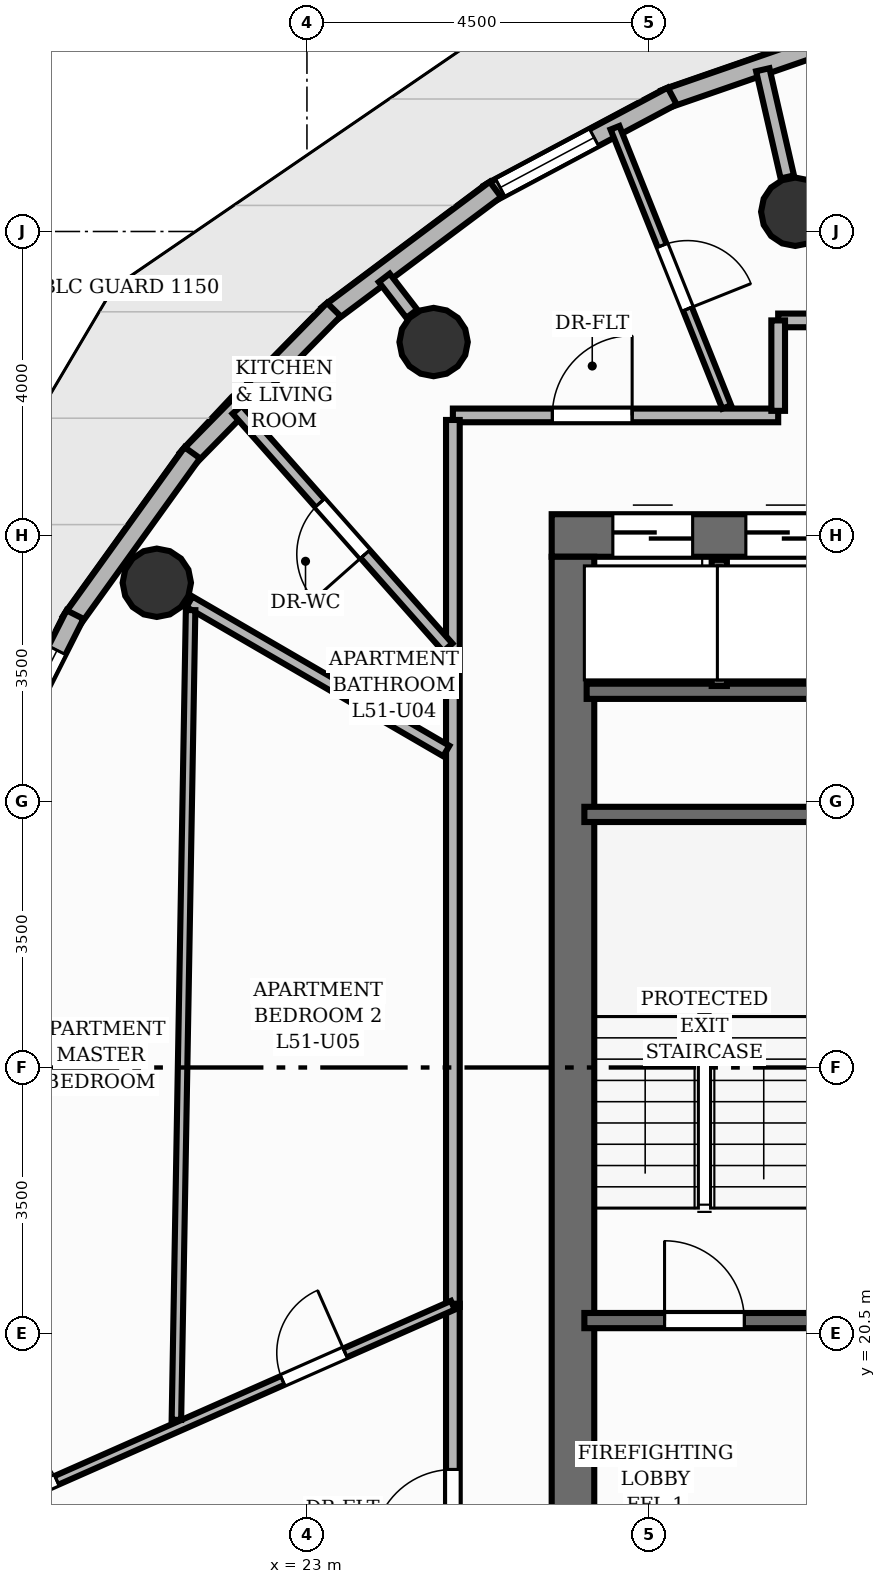
"""IFC4 building model, lengths in metres.
Left out: names, types, materials, properties, quantities, classifications, styles, units other than length and angle.
Written with IfcOpenShell. Run it as: python <this file> out.ifc"""

import sys

from ifc_helpers import new_model, si_unit, direction, frame, frame_2d, origin, origin_2d, place, context, subcontext, project, spatial, rectangle, circle, extrude, element, fill, save


model = new_model("IFC4")
c1 = context("Model", 3, precision=1e-05, world=origin(), true_north=direction((0.0, 1.0)))
c2 = subcontext(c1, "Body", "Model", "MODEL_VIEW")
j1 = project(units=[si_unit("LENGTHUNIT", "METRE"), si_unit("PLANEANGLEUNIT", "RADIAN")], contexts=[c1])
p1 = place(None, origin())
s1 = spatial("IfcSite", under=j1, at=p1, CompositionType="ELEMENT")
p2 = place(p1, origin())
s2 = spatial("IfcBuilding", under=s1, at=p2, CompositionType="ELEMENT")
p3 = place(p2, frame((0.0, 0.0, 172.64)))
s3 = spatial("IfcBuildingStorey", under=s2, at=p3, CompositionType="ELEMENT", Elevation=172.64)
p4 = place(p3, frame((26.22, 31.0, 0.0), z_axis=(0.0, 0.0, 1.0), x_axis=(1.0, 0.0, 0.0)))
e1 = element("IfcWall", 1, at=p4, inside=s3, PredefinedType="SHEAR", context=c2, shape_type="SweptSolid", body=[
    extrude(rectangle(XDim=11.56, YDim=0.56, at=frame_2d((5.78, 0.0))), origin(), (0.0, 0.0, 1.0), 3.2),
])
p5 = place(p4, frame((8.18, 0.0, 0.0)))
e2 = element("IfcOpeningElement", 2, at=p5, cuts=e1, PredefinedType="OPENING", context=c2, shape_type="SweptSolid", body=[
    extrude(rectangle(XDim=1.1, YDim=2.15, at=frame_2d((0.55, 1.075))), frame((0.0, 0.29, 0.0), z_axis=(0.0, -1.0, 0.0), x_axis=(1.0, 0.0, 0.0)), (0.0, 0.0, 1.0), 0.58),
])
p6 = place(p4, frame((0.805, 0.0, 0.0)))
e3 = element("IfcOpeningElement", 3, at=p6, cuts=e1, PredefinedType="OPENING", context=c2, shape_type="SweptSolid", body=[
    extrude(rectangle(XDim=1.05, YDim=2.15, at=frame_2d((0.525, 1.075))), frame((0.0, 0.29, 0.0), z_axis=(0.0, -1.0, 0.0), x_axis=(1.0, 0.0, 0.0)), (0.0, 0.0, 1.0), 0.58),
])
p7 = place(p4, frame((2.555, 0.0, 0.0)))
e4 = element("IfcOpeningElement", 4, at=p7, cuts=e1, PredefinedType="OPENING", context=c2, shape_type="SweptSolid", body=[
    extrude(rectangle(XDim=1.05, YDim=2.15, at=frame_2d((0.525, 1.075))), frame((0.0, 0.29, 0.0), z_axis=(0.0, -1.0, 0.0), x_axis=(1.0, 0.0, 0.0)), (0.0, 0.0, 1.0), 0.58),
])
p8 = place(p4, frame((4.305, 0.0, 0.0)))
e5 = element("IfcOpeningElement", 5, at=p8, cuts=e1, PredefinedType="OPENING", context=c2, shape_type="SweptSolid", body=[
    extrude(rectangle(XDim=1.05, YDim=2.15, at=frame_2d((0.525, 1.075))), frame((0.0, 0.29, 0.0), z_axis=(0.0, -1.0, 0.0), x_axis=(1.0, 0.0, 0.0)), (0.0, 0.0, 1.0), 0.58),
])
p9 = place(p3, frame((26.5, 17.28, 0.0), z_axis=(0.0, 0.0, 1.0), x_axis=(0.0, 1.0, 0.0)))
e6 = element("IfcWall", 6, at=p9, inside=s3, PredefinedType="SHEAR", context=c2, shape_type="SweptSolid", body=[
    extrude(rectangle(XDim=13.44, YDim=0.56, at=frame_2d((6.72, 0.0))), origin(), (0.0, 0.0, 1.0), 3.2),
])
for number, where, z_axis, x_axis in (
    (7, (29.425, 35.26, 0.0), (0.0, 0.0, 1.0), (1.0, 0.0, 0.0)),
    (8, (24.667, 33.545, 0.0), (0.0, 0.0, 1.0), (1.0, 0.0, 0.0)),
    (9, (21.025, 30.378, 0.0), (0.0, 0.0, 1.0), (1.0, 0.0, 0.0)),
):
    element("IfcColumn", number, at=place(p3, frame(where, z_axis=z_axis, x_axis=x_axis)), inside=s3, PredefinedType="COLUMN", context=c2, shape_type="SweptSolid", body=[
        extrude(circle(Radius=0.45, at=origin_2d()), origin(), (0.0, 0.0, 1.0), 3.2),
    ])
p10 = place(p3, frame((27.705, 36.739, 0.0), z_axis=(0.0, 0.0, 1.0), x_axis=(0.945016150651, 0.327023661236, 0.0)))
e10 = element("IfcWall", 10, at=p10, inside=s3, PredefinedType="SOLIDWALL", context=c2, shape_type="SweptSolid", body=[
    extrude(rectangle(XDim=2.702, YDim=0.25, at=frame_2d((1.351, 0.0))), origin(), (0.0, 0.0, 1.0), 2.96),
])
p11 = place(p3, frame((25.388, 35.495, 0.0), z_axis=(0.0, 0.0, 1.0), x_axis=(0.88257494418, 0.47017174299, 0.0)))
e11 = element("IfcWall", 11, at=p11, inside=s3, PredefinedType="SOLIDWALL", context=c2, shape_type="SweptSolid", body=[
    extrude(rectangle(XDim=2.739, YDim=0.25, at=frame_2d((1.369, 0.0))), origin(), (0.0, 0.0, 1.0), 2.96),
])
p12 = place(p11, frame((0.175, 0.0, 0.85)))
e12 = element("IfcOpeningElement", 12, at=p12, cuts=e11, PredefinedType="OPENING", context=c2, shape_type="SweptSolid", body=[
    extrude(rectangle(XDim=1.4, YDim=1.55, at=frame_2d((0.7, 0.775))), frame((0.0, 0.135, 0.0), z_axis=(0.0, -1.0, 0.0), x_axis=(1.0, 0.0, 0.0)), (0.0, 0.0, 1.0), 0.27),
])
p13 = place(p3, frame((23.272, 33.901, 0.0), z_axis=(0.0, 0.0, 1.0), x_axis=(0.800636941996, 0.599149803564, 0.0)))
e13 = element("IfcWall", 13, at=p13, inside=s3, PredefinedType="SOLIDWALL", context=c2, shape_type="SweptSolid", body=[
    extrude(rectangle(XDim=2.758, YDim=0.25, at=frame_2d((1.379, 0.0))), origin(), (0.0, 0.0, 1.0), 2.96),
])
p14 = place(p3, frame((21.421, 32.005, 0.0), z_axis=(0.0, 0.0, 1.0), x_axis=(0.700794099323, 0.713363603189, 0.0)))
e14 = element("IfcWall", 14, at=p14, inside=s3, PredefinedType="SOLIDWALL", context=c2, shape_type="SweptSolid", body=[
    extrude(rectangle(XDim=2.758, YDim=0.25, at=frame_2d((1.379, 0.0))), origin(), (0.0, 0.0, 1.0), 2.96),
])
p15 = place(p3, frame((19.892, 29.865, 0.0), z_axis=(0.0, 0.0, 1.0), x_axis=(0.583975860001, 0.811771023711, 0.0)))
e15 = element("IfcWall", 15, at=p15, inside=s3, PredefinedType="SOLIDWALL", context=c2, shape_type="SweptSolid", body=[
    extrude(rectangle(XDim=2.738, YDim=0.25, at=frame_2d((1.369, 0.0))), origin(), (0.0, 0.0, 1.0), 2.96),
])
p16 = place(p3, frame((18.732, 27.547, 0.0), z_axis=(0.0, 0.0, 1.0), x_axis=(0.450391703917, 0.892831066352, 0.0)))
e16 = element("IfcWall", 16, at=p16, inside=s3, PredefinedType="SOLIDWALL", context=c2, shape_type="SweptSolid", body=[
    extrude(rectangle(XDim=2.702, YDim=0.25, at=frame_2d((1.351, 0.0))), origin(), (0.0, 0.0, 1.0), 2.96),
])
p17 = place(p16, frame((0.526, 0.0, 0.85)))
e17 = element("IfcOpeningElement", 17, at=p17, cuts=e16, PredefinedType="OPENING", context=c2, shape_type="SweptSolid", body=[
    extrude(rectangle(XDim=1.65, YDim=1.55, at=frame_2d((0.825, 0.775))), frame((0.0, 0.135, 0.0), z_axis=(0.0, -1.0, 0.0), x_axis=(1.0, 0.0, 0.0)), (0.0, 0.0, 1.0), 0.27),
])
p18 = place(p3, frame((26.65, 27.33, 0.0), z_axis=(0.0, 0.0, 1.0), x_axis=(1.0, 0.0, 0.0)))
e18 = element("IfcWall", 18, at=p18, inside=s3, PredefinedType="SHEAR", context=c2, shape_type="SweptSolid", body=[
    extrude(rectangle(XDim=3.24, YDim=0.2, at=frame_2d((1.62, 0.0))), origin(), (0.0, 0.0, 1.0), 3.2),
])
p19 = place(p3, frame((26.65, 20.67, 0.0), z_axis=(0.0, 0.0, 1.0), x_axis=(1.0, 0.0, 0.0)))
e19 = element("IfcWall", 19, at=p19, inside=s3, PredefinedType="SHEAR", context=c2, shape_type="SweptSolid", body=[
    extrude(rectangle(XDim=3.24, YDim=0.2, at=frame_2d((1.62, 0.0))), origin(), (0.0, 0.0, 1.0), 3.2),
])
p20 = place(p19, frame((1.055, 0.0, 0.0)))
e20 = element("IfcOpeningElement", 20, at=p20, cuts=e19, PredefinedType="OPENING", context=c2, shape_type="SweptSolid", body=[
    extrude(rectangle(XDim=1.05, YDim=2.15, at=frame_2d((0.525, 1.075))), frame((0.0, 0.11, 0.0), z_axis=(0.0, -1.0, 0.0), x_axis=(1.0, 0.0, 0.0)), (0.0, 0.0, 1.0), 0.22),
])
p21 = place(p3, frame((26.68, 28.95, 0.0), z_axis=(0.0, 0.0, 1.0), x_axis=(1.0, 0.0, 0.0)))
e21 = element("IfcWall", 21, at=p21, inside=s3, PredefinedType="SHEAR", context=c2, shape_type="SweptSolid", body=[
    extrude(rectangle(XDim=5.24, YDim=0.2, at=frame_2d((2.62, 0.0))), origin(), (0.0, 0.0, 1.0), 3.2),
])
p22 = place(p3, frame((28.425, 29.02, 0.0), z_axis=(0.0, 0.0, 1.0), x_axis=(0.0, 1.0, 0.0)))
e22 = element("IfcWall", 22, at=p22, inside=s3, PredefinedType="SHEAR", context=c2, shape_type="SweptSolid", body=[
    extrude(rectangle(XDim=1.66, YDim=0.2, at=frame_2d((0.83, 0.0))), origin(), (0.0, 0.0, 1.0), 3.2),
])
p23 = place(p3, frame((29.32, 35.718, 0.0), z_axis=(0.0, 0.0, 1.0), x_axis=(-0.22299884629, 0.974818708557, 0.0)))
e23 = element("IfcWall", 23, at=p23, inside=s3, PredefinedType="PARTITIONING", context=c2, shape_type="SweptSolid", body=[
    extrude(rectangle(XDim=1.447, YDim=0.18, at=frame_2d((0.724, 0.0))), origin(), (0.0, 0.0, 1.0), 2.404),
])
p24 = place(p3, frame((24.38, 33.918, 0.0), z_axis=(0.0, 0.0, 1.0), x_axis=(-0.609274747308, 0.792959193334, 0.0)))
e24 = element("IfcWall", 24, at=p24, inside=s3, PredefinedType="PARTITIONING", context=c2, shape_type="SweptSolid", body=[
    extrude(rectangle(XDim=0.595, YDim=0.18, at=frame_2d((0.298, 0.0))), origin(), (0.0, 0.0, 1.0), 2.404),
])
p25 = place(p3, frame((29.2, 33.83, 0.0), z_axis=(0.0, 0.0, 1.0), x_axis=(1.0, 0.0, 0.0)))
e25 = element("IfcWall", 25, at=p25, inside=s3, PredefinedType="PARTITIONING", context=c2, shape_type="SweptSolid", body=[
    extrude(rectangle(XDim=5.6, YDim=0.18, at=frame_2d((2.8, 0.0))), origin(), (0.0, 0.0, 1.0), 2.955),
])
p26 = place(p3, frame((24.92, 32.58, 0.0), z_axis=(0.0, 0.0, 1.0), x_axis=(1.0, 0.0, 0.0)))
e26 = element("IfcWall", 26, at=p26, inside=s3, PredefinedType="PARTITIONING", context=c2, shape_type="SweptSolid", body=[
    extrude(rectangle(XDim=4.28, YDim=0.18, at=frame_2d((2.14, 0.0))), origin(), (0.0, 0.0, 1.0), 2.955),
])
p27 = place(p26, frame((1.309, 0.0, 0.0)))
e27 = element("IfcOpeningElement", 27, at=p27, cuts=e26, PredefinedType="OPENING", context=c2, shape_type="SweptSolid", body=[
    extrude(rectangle(XDim=1.05, YDim=2.15, at=frame_2d((0.525, 1.075))), frame((0.0, 0.1, 0.0), z_axis=(0.0, -1.0, 0.0), x_axis=(1.0, 0.0, 0.0)), (0.0, 0.0, 1.0), 0.2),
])
p28 = place(p3, frame((24.92, 20.85, 0.0), z_axis=(0.0, 0.0, 1.0), x_axis=(0.0, 1.0, 0.0)))
e28 = element("IfcWall", 28, at=p28, inside=s3, PredefinedType="PARTITIONING", context=c2, shape_type="SweptSolid", body=[
    extrude(rectangle(XDim=11.67, YDim=0.18, at=frame_2d((5.835, 0.0))), origin(), (0.0, 0.0, 1.0), 2.955),
])
p29 = place(p3, frame((29.2, 32.64, 0.0), z_axis=(0.0, 0.0, 1.0), x_axis=(0.0, 1.0, 0.0)))
e29 = element("IfcWall", 29, at=p29, inside=s3, PredefinedType="PARTITIONING", context=c2, shape_type="SweptSolid", body=[
    extrude(rectangle(XDim=1.19, YDim=0.18, at=frame_2d((0.595, 0.0))), origin(), (0.0, 0.0, 1.0), 2.955),
])
p30 = place(p3, frame((24.92, 15.48, 0.0), z_axis=(0.0, 0.0, 1.0), x_axis=(0.0, 1.0, 0.0)))
e30 = element("IfcWall", 30, at=p30, inside=s3, PredefinedType="PARTITIONING", context=c2, shape_type="SweptSolid", body=[
    extrude(rectangle(XDim=5.412, YDim=0.18, at=frame_2d((2.706, 0.0))), origin(), (0.0, 0.0, 1.0), 2.955),
])
p31 = place(p30, frame((2.181, 0.0, 0.0)))
e31 = element("IfcOpeningElement", 31, at=p31, cuts=e30, PredefinedType="OPENING", context=c2, shape_type="SweptSolid", body=[
    extrude(rectangle(XDim=1.05, YDim=2.15, at=frame_2d((0.525, 1.075))), frame((0.0, 0.1, 0.0), z_axis=(0.0, -1.0, 0.0), x_axis=(1.0, 0.0, 0.0)), (0.0, 0.0, 1.0), 0.2),
])
p32 = place(p3, frame((24.854, 29.527, 0.0), z_axis=(0.0, 0.0, 1.0), x_axis=(-0.663007196405, 0.748613022539, 0.0)))
e32 = element("IfcWall", 32, at=p32, inside=s3, PredefinedType="PLUMBINGWALL", context=c2, shape_type="SweptSolid", body=[
    extrude(rectangle(XDim=4.181, YDim=0.16, at=frame_2d((2.09, 0.0))), origin(), (0.0, 0.0, 1.0), 2.692),
])
p33 = place(p32, frame((1.64, 0.0, 0.0)))
e33 = element("IfcOpeningElement", 33, at=p33, cuts=e32, PredefinedType="OPENING", context=c2, shape_type="SweptSolid", body=[
    extrude(rectangle(XDim=0.9, YDim=2.1, at=frame_2d((0.45, 1.05))), frame((0.0, 0.09, 0.0), z_axis=(0.0, -1.0, 0.0), x_axis=(1.0, 0.0, 0.0)), (0.0, 0.0, 1.0), 0.18),
])
p34 = place(p3, frame((27.053, 36.365, 0.0), z_axis=(0.0, 0.0, 1.0), x_axis=(0.371454506587, -0.928451156247, 0.0)))
e34 = element("IfcWall", 34, at=p34, inside=s3, PredefinedType="PARTITIONING", context=c2, shape_type="SweptSolid", body=[
    extrude(rectangle(XDim=3.957, YDim=0.125, at=frame_2d((1.979, 0.0))), origin(), (0.0, 0.0, 1.0), 2.692),
])
p35 = place(p34, frame((1.668, 0.0, 0.0)))
e35 = element("IfcOpeningElement", 35, at=p35, cuts=e34, PredefinedType="OPENING", context=c2, shape_type="SweptSolid", body=[
    extrude(rectangle(XDim=0.9, YDim=2.1, at=frame_2d((0.45, 1.05))), frame((0.0, 0.073, 0.0), z_axis=(0.0, -1.0, 0.0), x_axis=(1.0, 0.0, 0.0)), (0.0, 0.0, 1.0), 0.145),
])
p36 = place(p3, frame((24.833, 28.164, 0.0), z_axis=(0.0, 0.0, 1.0), x_axis=(-0.864611299978, 0.50244133981, 0.0)))
e36 = element("IfcWall", 36, at=p36, inside=s3, PredefinedType="PLUMBINGWALL", context=c2, shape_type="SweptSolid", body=[
    extrude(rectangle(XDim=3.909, YDim=0.16, at=frame_2d((1.955, 0.0))), origin(), (0.0, 0.0, 1.0), 2.404),
])
p37 = place(p3, frame((18.317, 17.954, 0.0), z_axis=(0.0, 0.0, 1.0), x_axis=(0.914699105929, 0.404135553512, 0.0)))
e37 = element("IfcWall", 37, at=p37, inside=s3, PredefinedType="PARTITIONING", context=c2, shape_type="SweptSolid", body=[
    extrude(rectangle(XDim=7.219, YDim=0.125, at=frame_2d((3.609, 0.0))), origin(), (0.0, 0.0, 1.0), 2.692),
])
p38 = place(p37, frame((0.621, 0.0, 0.0)))
e38 = element("IfcOpeningElement", 38, at=p38, cuts=e37, PredefinedType="OPENING", context=c2, shape_type="SweptSolid", body=[
    extrude(rectangle(XDim=0.9, YDim=2.1, at=frame_2d((0.45, 1.05))), frame((0.0, 0.073, 0.0), z_axis=(0.0, -1.0, 0.0), x_axis=(1.0, 0.0, 0.0)), (0.0, 0.0, 1.0), 0.145),
])
p39 = place(p37, frame((4.77, 0.0, 0.0)))
e39 = element("IfcOpeningElement", 39, at=p39, cuts=e37, PredefinedType="OPENING", context=c2, shape_type="SweptSolid", body=[
    extrude(rectangle(XDim=0.9, YDim=2.1, at=frame_2d((0.45, 1.05))), frame((0.0, 0.073, 0.0), z_axis=(0.0, -1.0, 0.0), x_axis=(1.0, 0.0, 0.0)), (0.0, 0.0, 1.0), 0.145),
])
p40 = place(p3, frame((21.469, 30.019, 0.0), z_axis=(0.0, 0.0, 1.0), x_axis=(-0.017526694913, -0.999846395686, 0.0)))
e40 = element("IfcWall", 40, at=p40, inside=s3, PredefinedType="PARTITIONING", context=c2, shape_type="SweptSolid", body=[
    extrude(rectangle(XDim=10.656, YDim=0.125, at=frame_2d((5.328, 0.0))), origin(), (0.0, 0.0, 1.0), 2.955),
])
p41 = place(p12, origin())
e41 = element("IfcWindow", 41, at=p41, inside=s3, PartitioningType="SINGLE_PANEL", PredefinedType="WINDOW", context=c2, shape_type="SweptSolid", body=[
    extrude(rectangle(XDim=1.4, YDim=1.55, at=frame_2d((0.7, 0.775))), frame((0.0, 0.03, 0.0), z_axis=(0.0, -1.0, 0.0), x_axis=(1.0, 0.0, 0.0)), (0.0, 0.0, 1.0), 0.06),
])
fill(e12, e41)
p42 = place(p17, origin())
e42 = element("IfcWindow", 42, at=p42, inside=s3, PartitioningType="SINGLE_PANEL", PredefinedType="WINDOW", context=c2, shape_type="SweptSolid", body=[
    extrude(rectangle(XDim=1.65, YDim=1.55, at=frame_2d((0.825, 0.775))), frame((0.0, 0.03, 0.0), z_axis=(0.0, -1.0, 0.0), x_axis=(1.0, 0.0, 0.0)), (0.0, 0.0, 1.0), 0.06),
])
fill(e17, e42)
p43 = place(p20, origin())
e43 = element("IfcDoor", 43, at=p43, inside=s3, OperationType="SINGLE_SWING_LEFT", PredefinedType="DOOR", context=c2, shape_type="SweptSolid", body=[
    extrude(rectangle(XDim=1.05, YDim=2.15, at=frame_2d((0.525, 1.075))), frame((0.0, 0.025, 0.0), z_axis=(0.0, -1.0, 0.0), x_axis=(1.0, 0.0, 0.0)), (0.0, 0.0, 1.0), 0.05),
])
fill(e20, e43)
p44 = place(p6, origin())
e44 = element("IfcDoor", 44, at=p44, inside=s3, OperationType="DOUBLE_DOOR_SLIDING", PredefinedType="DOOR", context=c2, shape_type="SweptSolid", body=[
    extrude(rectangle(XDim=1.05, YDim=2.15, at=frame_2d((0.525, 1.075))), frame((0.0, 0.025, 0.0), z_axis=(0.0, -1.0, 0.0), x_axis=(1.0, 0.0, 0.0)), (0.0, 0.0, 1.0), 0.05),
])
fill(e3, e44)
p45 = place(p7, origin())
e45 = element("IfcDoor", 45, at=p45, inside=s3, OperationType="DOUBLE_DOOR_SLIDING", PredefinedType="DOOR", context=c2, shape_type="SweptSolid", body=[
    extrude(rectangle(XDim=1.05, YDim=2.15, at=frame_2d((0.525, 1.075))), frame((0.0, 0.025, 0.0), z_axis=(0.0, -1.0, 0.0), x_axis=(1.0, 0.0, 0.0)), (0.0, 0.0, 1.0), 0.05),
])
fill(e4, e45)
p46 = place(p27, origin())
e46 = element("IfcDoor", 46, at=p46, inside=s3, OperationType="SINGLE_SWING_RIGHT", PredefinedType="DOOR", context=c2, shape_type="SweptSolid", body=[
    extrude(rectangle(XDim=1.05, YDim=2.15, at=frame_2d((0.525, 1.075))), frame((0.0, 0.025, 0.0), z_axis=(0.0, -1.0, 0.0), x_axis=(1.0, 0.0, 0.0)), (0.0, 0.0, 1.0), 0.05),
])
fill(e27, e46)
p47 = place(p33, origin())
e47 = element("IfcDoor", 47, at=p47, inside=s3, OperationType="SINGLE_SWING_LEFT", PredefinedType="DOOR", context=c2, shape_type="SweptSolid", body=[
    extrude(rectangle(XDim=0.9, YDim=2.1, at=frame_2d((0.45, 1.05))), frame((0.0, 0.025, 0.0), z_axis=(0.0, -1.0, 0.0), x_axis=(1.0, 0.0, 0.0)), (0.0, 0.0, 1.0), 0.05),
])
fill(e33, e47)
p48 = place(p35, origin())
e48 = element("IfcDoor", 48, at=p48, inside=s3, OperationType="SINGLE_SWING_RIGHT", PredefinedType="DOOR", context=c2, shape_type="SweptSolid", body=[
    extrude(rectangle(XDim=0.9, YDim=2.1, at=frame_2d((0.45, 1.05))), frame((0.0, 0.025, 0.0), z_axis=(0.0, -1.0, 0.0), x_axis=(1.0, 0.0, 0.0)), (0.0, 0.0, 1.0), 0.05),
])
fill(e35, e48)
p49 = place(p31, origin())
e49 = element("IfcDoor", 49, at=p49, inside=s3, OperationType="SINGLE_SWING_LEFT", PredefinedType="DOOR", context=c2, shape_type="SweptSolid", body=[
    extrude(rectangle(XDim=1.05, YDim=2.15, at=frame_2d((0.525, 1.075))), frame((0.0, 0.025, 0.0), z_axis=(0.0, -1.0, 0.0), x_axis=(1.0, 0.0, 0.0)), (0.0, 0.0, 1.0), 0.05),
])
fill(e31, e49)
p50 = place(p38, origin())
e50 = element("IfcDoor", 50, at=p50, inside=s3, OperationType="SINGLE_SWING_LEFT", PredefinedType="DOOR", context=c2, shape_type="SweptSolid", body=[
    extrude(rectangle(XDim=0.9, YDim=2.1, at=frame_2d((0.45, 1.05))), frame((0.0, 0.025, 0.0), z_axis=(0.0, -1.0, 0.0), x_axis=(1.0, 0.0, 0.0)), (0.0, 0.0, 1.0), 0.05),
])
fill(e38, e50)
p51 = place(p39, origin())
e51 = element("IfcDoor", 51, at=p51, inside=s3, OperationType="SINGLE_SWING_RIGHT", PredefinedType="DOOR", context=c2, shape_type="SweptSolid", body=[
    extrude(rectangle(XDim=0.9, YDim=2.1, at=frame_2d((0.45, 1.05))), frame((0.0, 0.025, 0.0), z_axis=(0.0, -1.0, 0.0), x_axis=(1.0, 0.0, 0.0)), (0.0, 0.0, 1.0), 0.05),
])
fill(e39, e51)
save(model, sys.argv[1])
